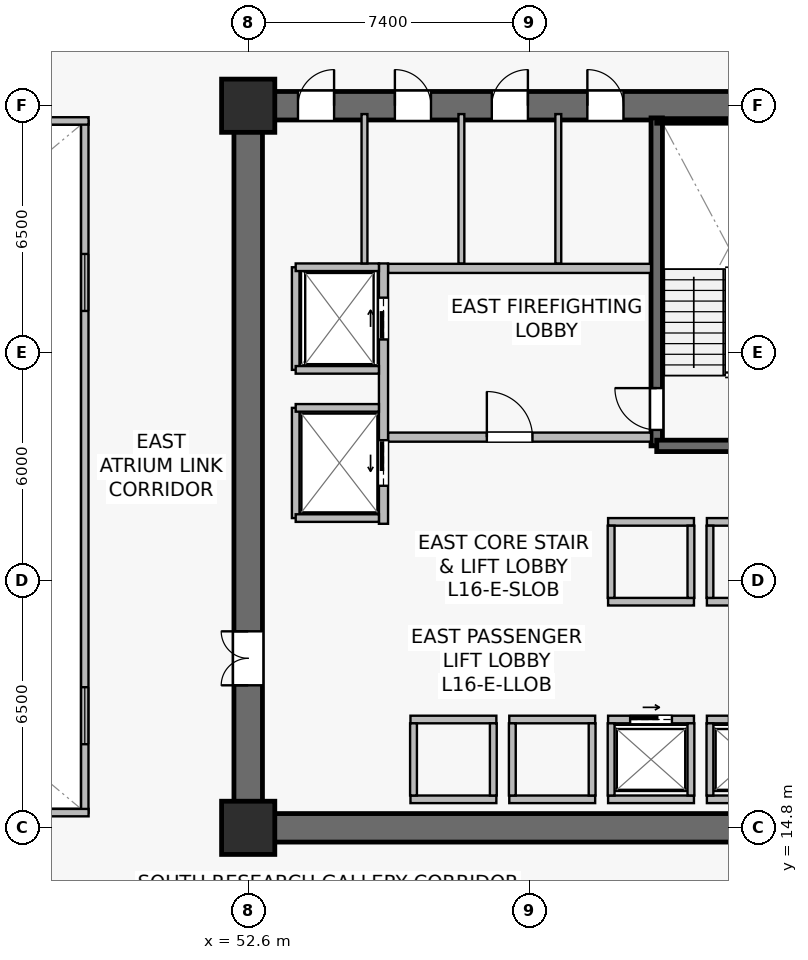
"""IFC4 building model, lengths in metres.
Left out: names, types, materials, properties, quantities, classifications, styles, units other than length and angle.
Written with IfcOpenShell. Run it as: python <this file> out.ifc"""

import sys

from ifc_helpers import new_model, si_unit, direction, frame, frame_2d, origin, origin_2d, place, context, subcontext, project, spatial, rectangle, extrude, source, transform, mapped, element, fill, save


model = new_model("IFC4")
c1 = context("Model", 3, precision=1e-05, world=origin(), true_north=direction((0.0, 1.0)))
c2 = subcontext(c1, "Body", "Model", "MODEL_VIEW")
j1 = project(units=[si_unit("LENGTHUNIT", "METRE"), si_unit("PLANEANGLEUNIT", "RADIAN")], contexts=[c1])
p1 = place(None, origin())
s1 = spatial("IfcSite", under=j1, at=p1, CompositionType="ELEMENT")
p2 = place(p1, origin())
s2 = spatial("IfcBuilding", under=s1, at=p2, CompositionType="ELEMENT")
p3 = place(p2, frame((0.0, 0.0, 66.2)))
s3 = spatial("IfcBuildingStorey", under=s2, at=p3, CompositionType="ELEMENT", Elevation=66.2)
p4 = place(p3, frame((52.225, 14.8, 0.0), z_axis=(0.0, 0.0, 1.0), x_axis=(1.0, 0.0, 0.0)))
e1 = element("IfcWall", 1, at=p4, inside=s3, PredefinedType="SHEAR", context=c2, shape_type="SweptSolid", body=[
    extrude(rectangle(XDim=15.55, YDim=0.75, at=frame_2d((7.775, 0.0))), origin(), (0.0, 0.0, 1.0), 3.78),
])
p5 = place(p3, frame((52.225, 33.8, 0.0), z_axis=(0.0, 0.0, 1.0), x_axis=(1.0, 0.0, 0.0)))
e2 = element("IfcWall", 2, at=p5, inside=s3, PredefinedType="SHEAR", context=c2, shape_type="SweptSolid", body=[
    extrude(rectangle(XDim=15.55, YDim=0.75, at=frame_2d((7.775, 0.0))), origin(), (0.0, 0.0, 1.0), 3.78),
])
p6 = place(p5, frame((9.3, 0.0, 0.0)))
e3 = element("IfcOpeningElement", 3, at=p6, cuts=e2, PredefinedType="OPENING", context=c2, shape_type="SweptSolid", body=[
    extrude(rectangle(XDim=0.95, YDim=2.15, at=frame_2d((0.475, 1.075))), frame((0.0, 0.385, 0.0), z_axis=(0.0, -1.0, 0.0), x_axis=(1.0, 0.0, 0.0)), (0.0, 0.0, 1.0), 0.77),
])
p7 = place(p5, frame((6.785, 0.0, 0.0)))
e4 = element("IfcOpeningElement", 4, at=p7, cuts=e2, PredefinedType="OPENING", context=c2, shape_type="SweptSolid", body=[
    extrude(rectangle(XDim=0.95, YDim=2.15, at=frame_2d((0.475, 1.075))), frame((0.0, 0.385, 0.0), z_axis=(0.0, -1.0, 0.0), x_axis=(1.0, 0.0, 0.0)), (0.0, 0.0, 1.0), 0.77),
])
p8 = place(p5, frame((4.235, 0.0, 0.0)))
e5 = element("IfcOpeningElement", 5, at=p8, cuts=e2, PredefinedType="OPENING", context=c2, shape_type="SweptSolid", body=[
    extrude(rectangle(XDim=0.95, YDim=2.15, at=frame_2d((0.475, 1.075))), frame((0.0, 0.385, 0.0), z_axis=(0.0, -1.0, 0.0), x_axis=(1.0, 0.0, 0.0)), (0.0, 0.0, 1.0), 0.77),
])
p9 = place(p5, frame((1.685, 0.0, 0.0)))
e6 = element("IfcOpeningElement", 6, at=p9, cuts=e2, PredefinedType="OPENING", context=c2, shape_type="SweptSolid", body=[
    extrude(rectangle(XDim=0.95, YDim=2.15, at=frame_2d((0.475, 1.075))), frame((0.0, 0.385, 0.0), z_axis=(0.0, -1.0, 0.0), x_axis=(1.0, 0.0, 0.0)), (0.0, 0.0, 1.0), 0.77),
])
p10 = place(p3, frame((52.6, 15.175, 0.0), z_axis=(0.0, 0.0, 1.0), x_axis=(0.0, 1.0, 0.0)))
e7 = element("IfcWall", 7, at=p10, inside=s3, PredefinedType="SHEAR", context=c2, shape_type="SweptSolid", body=[
    extrude(rectangle(XDim=18.25, YDim=0.75, at=frame_2d((9.125, 0.0))), origin(), (0.0, 0.0, 1.0), 3.78),
])
p11 = place(p10, frame((3.375, 0.0, 0.0)))
e8 = element("IfcOpeningElement", 8, at=p11, cuts=e7, PredefinedType="OPENING", context=c2, shape_type="SweptSolid", body=[
    extrude(rectangle(XDim=1.42, YDim=2.2, at=frame_2d((0.71, 1.1))), frame((0.0, 0.385, 0.0), z_axis=(0.0, -1.0, 0.0), x_axis=(1.0, 0.0, 0.0)), (0.0, 0.0, 1.0), 0.77),
])
p12 = place(p3, frame((63.35, 24.85, 0.0), z_axis=(0.0, 0.0, 1.0), x_axis=(0.0, 1.0, 0.0)))
e9 = element("IfcWall", 9, at=p12, inside=s3, PredefinedType="SHEAR", context=c2, shape_type="SweptSolid", body=[
    extrude(rectangle(XDim=8.63, YDim=0.3, at=frame_2d((4.315, 0.0))), origin(), (0.0, 0.0, 1.0), 3.78),
])
p13 = place(p12, frame((0.42, 0.0, 0.0)))
e10 = element("IfcOpeningElement", 10, at=p13, cuts=e9, PredefinedType="OPENING", context=c2, shape_type="SweptSolid", body=[
    extrude(rectangle(XDim=1.1, YDim=2.15, at=frame_2d((0.55, 1.075))), frame((0.0, 0.16, 0.0), z_axis=(0.0, -1.0, 0.0), x_axis=(1.0, 0.0, 0.0)), (0.0, 0.0, 1.0), 0.32),
])
p14 = place(p3, frame((63.35, 24.85, 0.0), z_axis=(0.0, 0.0, 1.0), x_axis=(1.0, 0.0, 0.0)))
e11 = element("IfcWall", 11, at=p14, inside=s3, PredefinedType="SHEAR", context=c2, shape_type="SweptSolid", body=[
    extrude(rectangle(XDim=3.8, YDim=0.3, at=frame_2d((1.9, 0.0))), origin(), (0.0, 0.0, 1.0), 3.78),
])
p15 = place(p3, frame((63.35, 33.4, 0.0), z_axis=(0.0, 0.0, 1.0), x_axis=(1.0, 0.0, 0.0)))
e12 = element("IfcWall", 12, at=p15, inside=s3, PredefinedType="SOLIDWALL", context=c2, shape_type="SweptSolid", body=[
    extrude(rectangle(XDim=3.72, YDim=0.12, at=frame_2d((1.86, 0.0))), origin(), (0.0, 0.0, 1.0), 3.78),
])
m1 = source(origin(), c2, "Body", "SweptSolid", [
    extrude(rectangle(XDim=1.4, YDim=1.4, at=origin_2d()), origin(), (0.0, 0.0, 1.0), 4.1),
])
for number, where, z_axis, x_axis in (
    (13, (52.6, 14.8, 0.0), (0.0, 0.0, 1.0), (1.0, 0.0, 0.0)),
    (14, (52.6, 33.8, 0.0), (0.0, 0.0, 1.0), (1.0, 0.0, 0.0)),
):
    element("IfcColumn", number, at=place(p3, frame(where, z_axis=z_axis, x_axis=x_axis)), inside=s3, PredefinedType="COLUMN", context=c2, shape_type="MappedRepresentation", body=[
        mapped(m1, transform((0.0, 0.0, 0.0), scale=1.0)),
    ])
p16 = place(p3, frame((56.28, 25.08, 0.0), z_axis=(0.0, 0.0, 1.0), x_axis=(1.0, 0.0, 0.0)))
e15 = element("IfcWall", 15, at=p16, inside=s3, PredefinedType="SOLIDWALL", context=c2, shape_type="SweptSolid", body=[
    extrude(rectangle(XDim=6.92, YDim=0.24, at=frame_2d((3.46, 0.0))), origin(), (0.0, 0.0, 1.0), 3.115),
])
p17 = place(p16, frame((2.6, 0.0, 0.0)))
e16 = element("IfcOpeningElement", 16, at=p17, cuts=e15, PredefinedType="OPENING", context=c2, shape_type="SweptSolid", body=[
    extrude(rectangle(XDim=1.2, YDim=2.16, at=frame_2d((0.6, 1.08))), frame((0.0, 0.13, 0.0), z_axis=(0.0, -1.0, 0.0), x_axis=(1.0, 0.0, 0.0)), (0.0, 0.0, 1.0), 0.26),
])
p18 = place(p3, frame((56.28, 29.52, 0.0), z_axis=(0.0, 0.0, 1.0), x_axis=(1.0, 0.0, 0.0)))
e17 = element("IfcWall", 17, at=p18, inside=s3, PredefinedType="SOLIDWALL", context=c2, shape_type="SweptSolid", body=[
    extrude(rectangle(XDim=6.92, YDim=0.24, at=frame_2d((3.46, 0.0))), origin(), (0.0, 0.0, 1.0), 3.115),
])
p19 = place(p3, frame((56.16, 22.8, 0.0), z_axis=(0.0, 0.0, 1.0), x_axis=(0.0, 1.0, 0.0)))
e18 = element("IfcWall", 18, at=p19, inside=s3, PredefinedType="SOLIDWALL", context=c2, shape_type="SweptSolid", body=[
    extrude(rectangle(XDim=6.85, YDim=0.24, at=frame_2d((3.425, 0.0))), origin(), (0.0, 0.0, 1.0), 2.865),
])
p20 = place(p19, frame((4.85, 0.0, 0.0)))
e19 = element("IfcOpeningElement", 19, at=p20, cuts=e18, PredefinedType="OPENING", context=c2, shape_type="SweptSolid", body=[
    extrude(rectangle(XDim=1.1, YDim=2.22, at=frame_2d((0.55, 1.11))), frame((0.0, 0.13, 0.0), z_axis=(0.0, -1.0, 0.0), x_axis=(1.0, 0.0, 0.0)), (0.0, 0.0, 1.0), 0.26),
])
p21 = place(p19, frame((1.0, 0.0, 0.0)))
e20 = element("IfcOpeningElement", 20, at=p21, cuts=e18, PredefinedType="OPENING", context=c2, shape_type="SweptSolid", body=[
    extrude(rectangle(XDim=1.2, YDim=2.22, at=frame_2d((0.6, 1.11))), frame((0.0, 0.13, 0.0), z_axis=(0.0, -1.0, 0.0), x_axis=(1.0, 0.0, 0.0)), (0.0, 0.0, 1.0), 0.26),
])
p22 = place(p3, frame((64.67, 17.65, 0.0), z_axis=(0.0, 0.0, 1.0), x_axis=(1.0, 0.0, 0.0)))
e21 = element("IfcWall", 21, at=p22, inside=s3, PredefinedType="SOLIDWALL", context=c2, shape_type="SweptSolid", body=[
    extrude(rectangle(XDim=2.26, YDim=0.2, at=frame_2d((1.13, 0.0))), origin(), (0.0, 0.0, 1.0), 3.78),
])
p23 = place(p22, frame((0.58, 0.0, 0.0)))
e22 = element("IfcOpeningElement", 22, at=p23, cuts=e21, PredefinedType="OPENING", context=c2, shape_type="SweptSolid", body=[
    extrude(rectangle(XDim=1.1, YDim=2.22, at=frame_2d((0.55, 1.11))), frame((0.0, 0.11, 0.0), z_axis=(0.0, -1.0, 0.0), x_axis=(1.0, 0.0, 0.0)), (0.0, 0.0, 1.0), 0.22),
])
p24 = place(p3, frame((64.67, 15.55, 0.0), z_axis=(0.0, 0.0, 1.0), x_axis=(1.0, 0.0, 0.0)))
e23 = element("IfcWall", 23, at=p24, inside=s3, PredefinedType="SOLIDWALL", context=c2, shape_type="SweptSolid", body=[
    extrude(rectangle(XDim=2.26, YDim=0.2, at=frame_2d((1.13, 0.0))), origin(), (0.0, 0.0, 1.0), 3.78),
])
p25 = place(p3, frame((64.75, 15.65, 0.0), z_axis=(0.0, 0.0, 1.0), x_axis=(0.0, 1.0, 0.0)))
e24 = element("IfcWall", 24, at=p25, inside=s3, PredefinedType="SOLIDWALL", context=c2, shape_type="SweptSolid", body=[
    extrude(rectangle(XDim=1.9, YDim=0.18, at=frame_2d((0.95, 0.0))), origin(), (0.0, 0.0, 1.0), 3.78),
])
p26 = place(p3, frame((62.07, 17.65, 0.0), z_axis=(0.0, 0.0, 1.0), x_axis=(1.0, 0.0, 0.0)))
e25 = element("IfcWall", 25, at=p26, inside=s3, PredefinedType="SOLIDWALL", context=c2, shape_type="SweptSolid", body=[
    extrude(rectangle(XDim=2.26, YDim=0.2, at=frame_2d((1.13, 0.0))), origin(), (0.0, 0.0, 1.0), 3.78),
])
p27 = place(p26, frame((0.58, 0.0, 0.0)))
e26 = element("IfcOpeningElement", 26, at=p27, cuts=e25, PredefinedType="OPENING", context=c2, shape_type="SweptSolid", body=[
    extrude(rectangle(XDim=1.1, YDim=2.22, at=frame_2d((0.55, 1.11))), frame((0.0, 0.11, 0.0), z_axis=(0.0, -1.0, 0.0), x_axis=(1.0, 0.0, 0.0)), (0.0, 0.0, 1.0), 0.22),
])
p28 = place(p3, frame((62.07, 15.55, 0.0), z_axis=(0.0, 0.0, 1.0), x_axis=(1.0, 0.0, 0.0)))
e27 = element("IfcWall", 27, at=p28, inside=s3, PredefinedType="SOLIDWALL", context=c2, shape_type="SweptSolid", body=[
    extrude(rectangle(XDim=2.26, YDim=0.2, at=frame_2d((1.13, 0.0))), origin(), (0.0, 0.0, 1.0), 3.78),
])
for number, where, z_axis, x_axis in (
    (28, (62.15, 15.65, 0.0), (0.0, 0.0, 1.0), (0.0, 1.0, 0.0)),
    (29, (64.25, 15.65, 0.0), (0.0, 0.0, 1.0), (0.0, 1.0, 0.0)),
):
    element("IfcWall", number, at=place(p3, frame(where, z_axis=z_axis, x_axis=x_axis)), inside=s3, PredefinedType="SOLIDWALL", context=c2, shape_type="SweptSolid", body=[
        extrude(rectangle(XDim=1.9, YDim=0.18, at=frame_2d((0.95, 0.0))), origin(), (0.0, 0.0, 1.0), 3.78),
    ])
for number, where, z_axis, x_axis in (
    (30, (59.47, 17.65, 0.0), (0.0, 0.0, 1.0), (1.0, 0.0, 0.0)),
    (31, (59.47, 15.55, 0.0), (0.0, 0.0, 1.0), (1.0, 0.0, 0.0)),
):
    element("IfcWall", number, at=place(p3, frame(where, z_axis=z_axis, x_axis=x_axis)), inside=s3, PredefinedType="SOLIDWALL", context=c2, shape_type="SweptSolid", body=[
        extrude(rectangle(XDim=2.26, YDim=0.2, at=frame_2d((1.13, 0.0))), origin(), (0.0, 0.0, 1.0), 3.115),
    ])
for number, where, z_axis, x_axis in (
    (32, (59.55, 15.65, 0.0), (0.0, 0.0, 1.0), (0.0, 1.0, 0.0)),
    (33, (61.65, 15.65, 0.0), (0.0, 0.0, 1.0), (0.0, 1.0, 0.0)),
):
    element("IfcWall", number, at=place(p3, frame(where, z_axis=z_axis, x_axis=x_axis)), inside=s3, PredefinedType="SOLIDWALL", context=c2, shape_type="SweptSolid", body=[
        extrude(rectangle(XDim=1.9, YDim=0.18, at=frame_2d((0.95, 0.0))), origin(), (0.0, 0.0, 1.0), 3.78),
    ])
for number, where, z_axis, x_axis in (
    (34, (56.87, 17.65, 0.0), (0.0, 0.0, 1.0), (1.0, 0.0, 0.0)),
    (35, (56.87, 15.55, 0.0), (0.0, 0.0, 1.0), (1.0, 0.0, 0.0)),
):
    element("IfcWall", number, at=place(p3, frame(where, z_axis=z_axis, x_axis=x_axis)), inside=s3, PredefinedType="SOLIDWALL", context=c2, shape_type="SweptSolid", body=[
        extrude(rectangle(XDim=2.26, YDim=0.2, at=frame_2d((1.13, 0.0))), origin(), (0.0, 0.0, 1.0), 3.78),
    ])
for number, where, z_axis, x_axis in (
    (36, (56.95, 15.65, 0.0), (0.0, 0.0, 1.0), (0.0, 1.0, 0.0)),
    (37, (59.05, 15.65, 0.0), (0.0, 0.0, 1.0), (0.0, 1.0, 0.0)),
):
    element("IfcWall", number, at=place(p3, frame(where, z_axis=z_axis, x_axis=x_axis)), inside=s3, PredefinedType="SOLIDWALL", context=c2, shape_type="SweptSolid", body=[
        extrude(rectangle(XDim=1.9, YDim=0.18, at=frame_2d((0.95, 0.0))), origin(), (0.0, 0.0, 1.0), 3.78),
    ])
for number, where, z_axis, x_axis in (
    (38, (64.67, 20.75, 0.0), (0.0, 0.0, 1.0), (1.0, 0.0, 0.0)),
    (39, (64.67, 22.85, 0.0), (0.0, 0.0, 1.0), (1.0, 0.0, 0.0)),
):
    element("IfcWall", number, at=place(p3, frame(where, z_axis=z_axis, x_axis=x_axis)), inside=s3, PredefinedType="SOLIDWALL", context=c2, shape_type="SweptSolid", body=[
        extrude(rectangle(XDim=2.26, YDim=0.2, at=frame_2d((1.13, 0.0))), origin(), (0.0, 0.0, 1.0), 3.78),
    ])
p29 = place(p3, frame((64.75, 20.85, 0.0), z_axis=(0.0, 0.0, 1.0), x_axis=(0.0, 1.0, 0.0)))
e40 = element("IfcWall", 40, at=p29, inside=s3, PredefinedType="SOLIDWALL", context=c2, shape_type="SweptSolid", body=[
    extrude(rectangle(XDim=1.9, YDim=0.18, at=frame_2d((0.95, 0.0))), origin(), (0.0, 0.0, 1.0), 3.78),
])
for number, where, z_axis, x_axis in (
    (41, (62.07, 20.75, 0.0), (0.0, 0.0, 1.0), (1.0, 0.0, 0.0)),
    (42, (62.07, 22.85, 0.0), (0.0, 0.0, 1.0), (1.0, 0.0, 0.0)),
):
    element("IfcWall", number, at=place(p3, frame(where, z_axis=z_axis, x_axis=x_axis)), inside=s3, PredefinedType="SOLIDWALL", context=c2, shape_type="SweptSolid", body=[
        extrude(rectangle(XDim=2.26, YDim=0.2, at=frame_2d((1.13, 0.0))), origin(), (0.0, 0.0, 1.0), 3.78),
    ])
for number, where, z_axis, x_axis in (
    (43, (62.15, 20.85, 0.0), (0.0, 0.0, 1.0), (0.0, 1.0, 0.0)),
    (44, (64.25, 20.85, 0.0), (0.0, 0.0, 1.0), (0.0, 1.0, 0.0)),
):
    element("IfcWall", number, at=place(p3, frame(where, z_axis=z_axis, x_axis=x_axis)), inside=s3, PredefinedType="SOLIDWALL", context=c2, shape_type="SweptSolid", body=[
        extrude(rectangle(XDim=1.9, YDim=0.18, at=frame_2d((0.95, 0.0))), origin(), (0.0, 0.0, 1.0), 3.78),
    ])
p30 = place(p3, frame((53.85, 26.85, 0.0), z_axis=(0.0, 0.0, 1.0), x_axis=(0.0, 1.0, 0.0)))
e45 = element("IfcWall", 45, at=p30, inside=s3, PredefinedType="SOLIDWALL", context=c2, shape_type="SweptSolid", body=[
    extrude(rectangle(XDim=2.7, YDim=0.2, at=frame_2d((1.35, 0.0))), origin(), (0.0, 0.0, 1.0), 3.78),
])
p31 = place(p3, frame((53.85, 29.55, 0.0), z_axis=(0.0, 0.0, 1.0), x_axis=(1.0, 0.0, 0.0)))
e46 = element("IfcWall", 46, at=p31, inside=s3, PredefinedType="SOLIDWALL", context=c2, shape_type="SweptSolid", body=[
    extrude(rectangle(XDim=2.19, YDim=0.2, at=frame_2d((1.095, 0.0))), origin(), (0.0, 0.0, 1.0), 3.78),
])
p32 = place(p3, frame((53.85, 26.85, 0.0), z_axis=(0.0, 0.0, 1.0), x_axis=(1.0, 0.0, 0.0)))
e47 = element("IfcWall", 47, at=p32, inside=s3, PredefinedType="SOLIDWALL", context=c2, shape_type="SweptSolid", body=[
    extrude(rectangle(XDim=2.19, YDim=0.2, at=frame_2d((1.095, 0.0))), origin(), (0.0, 0.0, 1.0), 3.177),
])
p33 = place(p3, frame((53.85, 22.95, 0.0), z_axis=(0.0, 0.0, 1.0), x_axis=(0.0, 1.0, 0.0)))
e48 = element("IfcWall", 48, at=p33, inside=s3, PredefinedType="SOLIDWALL", context=c2, shape_type="SweptSolid", body=[
    extrude(rectangle(XDim=2.9, YDim=0.2, at=frame_2d((1.45, 0.0))), origin(), (0.0, 0.0, 1.0), 2.865),
])
for number, where, z_axis, x_axis in (
    (49, (53.85, 25.85, 0.0), (0.0, 0.0, 1.0), (1.0, 0.0, 0.0)),
    (50, (53.85, 22.95, 0.0), (0.0, 0.0, 1.0), (1.0, 0.0, 0.0)),
):
    element("IfcWall", number, at=place(p3, frame(where, z_axis=z_axis, x_axis=x_axis)), inside=s3, PredefinedType="SOLIDWALL", context=c2, shape_type="SweptSolid", body=[
        extrude(rectangle(XDim=2.19, YDim=0.2, at=frame_2d((1.095, 0.0))), origin(), (0.0, 0.0, 1.0), 3.78),
    ])
for number, where, z_axis, x_axis in (
    (51, (60.76, 29.65, 0.0), (0.0, 0.0, 1.0), (0.0, 1.0, 0.0)),
    (52, (58.21, 29.65, 0.0), (0.0, 0.0, 1.0), (0.0, 1.0, 0.0)),
    (53, (55.66, 29.65, 0.0), (0.0, 0.0, 1.0), (0.0, 1.0, 0.0)),
):
    element("IfcWall", number, at=place(p3, frame(where, z_axis=z_axis, x_axis=x_axis)), inside=s3, PredefinedType="PLUMBINGWALL", context=c2, shape_type="SweptSolid", body=[
        extrude(rectangle(XDim=3.93, YDim=0.155, at=frame_2d((1.965, 0.0))), origin(), (0.0, 0.0, 1.0), 3.78),
    ])
p34 = place(p3, frame((48.3, 15.2, 0.0), z_axis=(0.0, 0.0, 1.0), x_axis=(0.0, 1.0, 0.0)))
e54 = element("IfcWall", 54, at=p34, inside=s3, PredefinedType="SOLIDWALL", context=c2, shape_type="SweptSolid", body=[
    extrude(rectangle(XDim=18.2, YDim=0.195, at=frame_2d((9.1, 0.0))), origin(), (0.0, 0.0, 1.0), 3.78),
])
p35 = place(p34, frame((1.8, 0.0, 0.9)))
e55 = element("IfcOpeningElement", 55, at=p35, cuts=e54, PredefinedType="OPENING", context=c2, shape_type="SweptSolid", body=[
    extrude(rectangle(XDim=1.5, YDim=1.4, at=frame_2d((0.75, 0.7))), frame((0.0, 0.107, 0.0), z_axis=(0.0, -1.0, 0.0), x_axis=(1.0, 0.0, 0.0)), (0.0, 0.0, 1.0), 0.215),
])
p36 = place(p34, frame((13.2, 0.0, 0.9)))
e56 = element("IfcOpeningElement", 56, at=p36, cuts=e54, PredefinedType="OPENING", context=c2, shape_type="SweptSolid", body=[
    extrude(rectangle(XDim=1.5, YDim=1.4, at=frame_2d((0.75, 0.7))), frame((0.0, 0.107, 0.0), z_axis=(0.0, -1.0, 0.0), x_axis=(1.0, 0.0, 0.0)), (0.0, 0.0, 1.0), 0.215),
])
for number, where, z_axis, x_axis in (
    (57, (26.4, 15.2, 0.0), (0.0, 0.0, 1.0), (1.0, 0.0, 0.0)),
    (58, (26.4, 33.4, 0.0), (0.0, 0.0, 1.0), (1.0, 0.0, 0.0)),
):
    element("IfcWall", number, at=place(p3, frame(where, z_axis=z_axis, x_axis=x_axis)), inside=s3, PredefinedType="SOLIDWALL", context=c2, shape_type="SweptSolid", body=[
        extrude(rectangle(XDim=22.0, YDim=0.195, at=frame_2d((11.0, 0.0))), origin(), (0.0, 0.0, 1.0), 3.78),
    ])
m2 = source(origin(), c2, "Body", "SweptSolid", [
    extrude(rectangle(XDim=1.5, YDim=1.4, at=frame_2d((0.75, 0.7))), frame((0.0, 0.03, 0.0), z_axis=(0.0, -1.0, 0.0), x_axis=(1.0, 0.0, 0.0)), (0.0, 0.0, 1.0), 0.06),
])
p37 = place(p35, origin())
e59 = element("IfcWindow", 59, at=p37, inside=s3, PartitioningType="SINGLE_PANEL", PredefinedType="WINDOW", context=c2, shape_type="MappedRepresentation", body=[
    mapped(m2, transform((0.0, 0.0, 0.0), scale=1.0)),
])
fill(e55, e59)
p38 = place(p36, origin())
e60 = element("IfcWindow", 60, at=p38, inside=s3, PartitioningType="SINGLE_PANEL", PredefinedType="WINDOW", context=c2, shape_type="MappedRepresentation", body=[
    mapped(m2, transform((0.0, 0.0, 0.0), scale=1.0)),
])
fill(e56, e60)
m3 = source(origin(), c2, "Body", "SweptSolid", [
    extrude(rectangle(XDim=1.1, YDim=2.15, at=frame_2d((0.55, 1.075))), frame((0.0, 0.025, 0.0), z_axis=(0.0, -1.0, 0.0), x_axis=(1.0, 0.0, 0.0)), (0.0, 0.0, 1.0), 0.05),
])
p39 = place(p13, origin())
e61 = element("IfcDoor", 61, at=p39, inside=s3, OperationType="SINGLE_SWING_RIGHT", PredefinedType="DOOR", context=c2, shape_type="MappedRepresentation", body=[
    mapped(m3, transform((0.0, 0.0, 0.0), scale=1.0)),
])
fill(e10, e61)
m4 = source(origin(), c2, "Body", "SweptSolid", [
    extrude(rectangle(XDim=1.2, YDim=2.16, at=frame_2d((0.6, 1.08))), frame((0.0, 0.025, 0.0), z_axis=(0.0, -1.0, 0.0), x_axis=(1.0, 0.0, 0.0)), (0.0, 0.0, 1.0), 0.05),
])
p40 = place(p17, origin())
e62 = element("IfcDoor", 62, at=p40, inside=s3, OperationType="SINGLE_SWING_LEFT", PredefinedType="DOOR", context=c2, shape_type="MappedRepresentation", body=[
    mapped(m4, transform((0.0, 0.0, 0.0), scale=1.0)),
])
fill(e16, e62)
m5 = source(origin(), c2, "Body", "SweptSolid", [
    extrude(rectangle(XDim=1.1, YDim=2.22, at=frame_2d((0.55, 1.11))), frame((0.0, 0.025, 0.0), z_axis=(0.0, -1.0, 0.0), x_axis=(1.0, 0.0, 0.0)), (0.0, 0.0, 1.0), 0.05),
])
p41 = place(p27, origin())
e63 = element("IfcDoor", 63, at=p41, inside=s3, OperationType="SLIDING_TO_RIGHT", PredefinedType="USERDEFINED", context=c2, shape_type="MappedRepresentation", body=[
    mapped(m5, transform((0.0, 0.0, 0.0), scale=1.0)),
])
fill(e26, e63)
p42 = place(p20, origin())
e64 = element("IfcDoor", 64, at=p42, inside=s3, OperationType="SLIDING_TO_RIGHT", PredefinedType="USERDEFINED", context=c2, shape_type="MappedRepresentation", body=[
    mapped(m5, transform((0.0, 0.0, 0.0), scale=1.0)),
])
fill(e19, e64)
m6 = source(origin(), c2, "Body", "SweptSolid", [
    extrude(rectangle(XDim=1.2, YDim=2.22, at=frame_2d((0.6, 1.11))), frame((0.0, 0.025, 0.0), z_axis=(0.0, -1.0, 0.0), x_axis=(1.0, 0.0, 0.0)), (0.0, 0.0, 1.0), 0.05),
])
p43 = place(p21, origin())
e65 = element("IfcDoor", 65, at=p43, inside=s3, OperationType="SLIDING_TO_LEFT", PredefinedType="USERDEFINED", context=c2, shape_type="MappedRepresentation", body=[
    mapped(m6, transform((0.0, 0.0, 0.0), scale=1.0)),
])
fill(e20, e65)
m7 = source(origin(), c2, "Body", "SweptSolid", [
    extrude(rectangle(XDim=1.42, YDim=2.2, at=frame_2d((0.71, 1.1))), frame((0.0, 0.025, 0.0), z_axis=(0.0, -1.0, 0.0), x_axis=(1.0, 0.0, 0.0)), (0.0, 0.0, 1.0), 0.05),
])
p44 = place(p11, origin())
e66 = element("IfcDoor", 66, at=p44, inside=s3, OperationType="DOUBLE_DOOR_SINGLE_SWING", PredefinedType="DOOR", context=c2, shape_type="MappedRepresentation", body=[
    mapped(m7, transform((0.0, 0.0, 0.0), scale=1.0)),
])
fill(e8, e66)
m8 = source(origin(), c2, "Body", "SweptSolid", [
    extrude(rectangle(XDim=0.95, YDim=2.15, at=frame_2d((0.475, 1.075))), frame((0.0, 0.025, 0.0), z_axis=(0.0, -1.0, 0.0), x_axis=(1.0, 0.0, 0.0)), (0.0, 0.0, 1.0), 0.05),
])
p45 = place(p6, origin())
e67 = element("IfcDoor", 67, at=p45, inside=s3, OperationType="SINGLE_SWING_LEFT", PredefinedType="DOOR", context=c2, shape_type="MappedRepresentation", body=[
    mapped(m8, transform((0.0, 0.0, 0.0), scale=1.0)),
])
fill(e3, e67)
p46 = place(p7, origin())
e68 = element("IfcDoor", 68, at=p46, inside=s3, OperationType="SINGLE_SWING_RIGHT", PredefinedType="DOOR", context=c2, shape_type="MappedRepresentation", body=[
    mapped(m8, transform((0.0, 0.0, 0.0), scale=1.0)),
])
fill(e4, e68)
p47 = place(p8, origin())
e69 = element("IfcDoor", 69, at=p47, inside=s3, OperationType="SINGLE_SWING_LEFT", PredefinedType="DOOR", context=c2, shape_type="MappedRepresentation", body=[
    mapped(m8, transform((0.0, 0.0, 0.0), scale=1.0)),
])
fill(e5, e69)
p48 = place(p9, origin())
e70 = element("IfcDoor", 70, at=p48, inside=s3, OperationType="SINGLE_SWING_RIGHT", PredefinedType="DOOR", context=c2, shape_type="MappedRepresentation", body=[
    mapped(m8, transform((0.0, 0.0, 0.0), scale=1.0)),
])
fill(e6, e70)
save(model, sys.argv[1])
